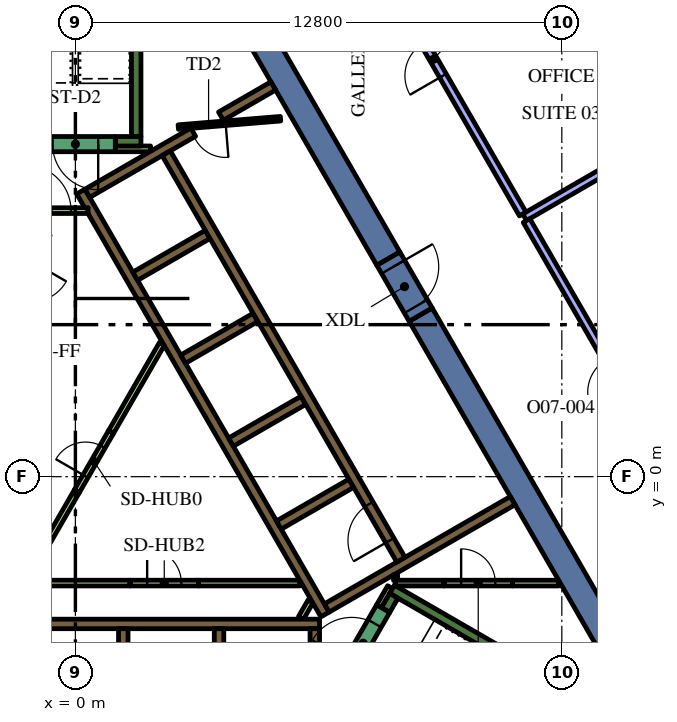
"""IFC4 building model, lengths in metres.
Left out: names, types, materials, properties, quantities, classifications, styles, units other than length and angle.
Written with IfcOpenShell. Run it as: python <this file> out.ifc"""

import sys

from ifc_helpers import new_model, si_unit, direction, frame, frame_2d, origin, place, context, subcontext, project, spatial, polyline, rectangle, outline, extrude, element, fill, save


model = new_model("IFC4")
c1 = context("Model", 3, precision=1e-05, world=origin(), true_north=direction((0.0, 1.0)))
c2 = subcontext(c1, "Body", "Model", "MODEL_VIEW")
j1 = project(units=[si_unit("LENGTHUNIT", "METRE"), si_unit("PLANEANGLEUNIT", "RADIAN")], contexts=[c1])
p1 = place(None, origin())
s1 = spatial("IfcSite", under=j1, at=p1, CompositionType="ELEMENT")
p2 = place(p1, origin())
s2 = spatial("IfcBuilding", under=s1, at=p2, CompositionType="ELEMENT")
p3 = place(p2, frame((0.0, 0.0, 214.2)))
s3 = spatial("IfcBuildingStorey", under=s2, at=p3, CompositionType="ELEMENT", Elevation=214.2)
for number, where, z_axis, x_axis in (
    (1, (9.085, 4.264, 0.0), (0.0, 0.0, 1.0), (0.5, -0.866, 0.0)),
    (2, (8.235, 5.736, 0.0), (0.0, 0.0, 1.0), (-0.5, 0.866, 0.0)),
):
    element("IfcWall", number, at=place(p3, frame(where, z_axis=z_axis, x_axis=x_axis)), inside=s3, PredefinedType="SOLIDWALL", context=c2, shape_type="SweptSolid", body=[
        extrude(rectangle(XDim=12.472, YDim=0.7, at=frame_2d((6.236, 0.0))), origin(), (0.0, 0.0, 1.0), 4.2),
    ])
p4 = place(p3, frame((8.334, -2.964, 0.0), z_axis=(0.0, 0.0, 1.0), x_axis=(0.866016039709, -0.500016218704, 0.0)))
e3 = element("IfcWall", 3, at=p4, inside=s3, PredefinedType="SOLIDWALL", context=c2, shape_type="SweptSolid", body=[
    extrude(rectangle(XDim=7.05, YDim=0.25, at=frame_2d((3.525, 0.0))), origin(), (0.0, 0.0, 1.0), 4.2),
])
p5 = place(p3, frame((8.163, -3.511, 0.0), z_axis=(0.0, 0.0, 1.0), x_axis=(0.500127794843, 0.865951608824, 0.0)))
e4 = element("IfcWall", 4, at=p5, inside=s3, PredefinedType="SOLIDWALL", context=c2, shape_type="SweptSolid", body=[
    extrude(rectangle(XDim=0.435, YDim=0.25, at=frame_2d((0.217, 0.0))), origin(), (0.0, 0.0, 1.0), 4.2),
])
p6 = place(p3, frame((1.6, 8.95, 0.0), z_axis=(0.0, 0.0, 1.0), x_axis=(0.0, 1.0, 0.0)))
e5 = element("IfcWall", 5, at=p6, inside=s3, PredefinedType="SOLIDWALL", context=c2, shape_type="SweptSolid", body=[
    extrude(rectangle(XDim=6.8, YDim=0.25, at=frame_2d((3.4, 0.0))), origin(), (0.0, 0.0, 1.0), 4.2),
])
p7 = place(p3, frame((1.05, 8.825, 0.0), z_axis=(0.0, 0.0, 1.0), x_axis=(1.0, 0.0, 0.0)))
e6 = element("IfcWall", 6, at=p7, inside=s3, PredefinedType="SOLIDWALL", context=c2, shape_type="SweptSolid", body=[
    extrude(rectangle(XDim=0.675, YDim=0.25, at=frame_2d((0.337, 0.0))), origin(), (0.0, 0.0, 1.0), 4.2),
])
p8 = place(p3, frame((-5.806, -3.875, 0.0), z_axis=(0.0, 0.0, 1.0), x_axis=(1.0, 0.0, 0.0)))
e7 = element("IfcWall", 7, at=p8, inside=s3, PredefinedType="SOLIDWALL", context=c2, shape_type="SweptSolid", body=[
    extrude(rectangle(XDim=12.231, YDim=0.25, at=frame_2d((6.116, 0.0))), origin(), (0.0, 0.0, 1.0), 4.2),
])
p9 = place(p3, frame((6.3, -7.24, 0.0), z_axis=(0.0, 0.0, 1.0), x_axis=(0.0, 1.0, 0.0)))
e8 = element("IfcWall", 8, at=p9, inside=s3, PredefinedType="SOLIDWALL", context=c2, shape_type="SweptSolid", body=[
    extrude(rectangle(XDim=3.24, YDim=0.25, at=frame_2d((1.62, 0.0))), origin(), (0.0, 0.0, 1.0), 4.2),
])
for number, where, z_axis, x_axis in (
    (9, (3.78, -4.0, 0.0), (0.0, 0.0, 1.0), (0.0, -1.0, 0.0)),
    (10, (1.26, -4.0, 0.0), (0.0, 0.0, 1.0), (0.0, -1.0, 0.0)),
):
    element("IfcWall", number, at=place(p3, frame(where, z_axis=z_axis, x_axis=x_axis)), inside=s3, PredefinedType="SOLIDWALL", context=c2, shape_type="SweptSolid", body=[
        extrude(rectangle(XDim=2.2, YDim=0.25, at=frame_2d((1.1, 0.0))), origin(), (0.0, 0.0, 1.0), 4.2),
    ])
p10 = place(p3, origin())
e11 = element("IfcWall", 11, at=p10, inside=s3, PredefinedType="SOLIDWALL", context=c2, shape_type="SweptSolid", body=[
    extrude(outline(polyline([(0.332, 6.925), (0.335, 6.925), (0.335, 6.925), (0.335, 6.925), (0.335, 7.075), (0.335, 7.075), (0.335, 7.075), (0.245, 7.075), (0.035, 7.439), (0.252, 7.564), (0.377, 7.348), (1.512, 5.382), (1.637, 5.165), (2.221, 4.153), (2.771, 3.199), (2.896, 2.983), (3.138, 2.564), (4.031, 1.017), (4.156, 0.801), (5.292, -1.165), (5.417, -1.382), (6.073, -2.519), (6.552, -3.348), (6.677, -3.564), (6.46, -3.689), (0.332, 6.925)])), origin(), (0.0, 0.0, 1.0), 4.2),
])
p11 = place(p3, frame((3.1, 9.064, 0.0), z_axis=(0.0, 0.0, 1.0), x_axis=(-0.866030133475, -0.499991807846, 0.0)))
e12 = element("IfcWall", 12, at=p11, inside=s3, PredefinedType="SOLIDWALL", context=c2, shape_type="SweptSolid", body=[
    extrude(rectangle(XDim=3.217, YDim=0.25, at=frame_2d((1.608, 0.0))), origin(), (0.0, 0.0, 1.0), 4.2),
])
p12 = place(p3, frame((1.574, 5.274, 0.0), z_axis=(0.0, 0.0, 1.0), x_axis=(0.866028486751, 0.499994660107, 0.0)))
e13 = element("IfcWall", 13, at=p12, inside=s3, PredefinedType="SOLIDWALL", context=c2, shape_type="SweptSolid", body=[
    extrude(rectangle(XDim=2.2, YDim=0.25, at=frame_2d((1.1, 0.0))), origin(), (0.0, 0.0, 1.0), 4.2),
])
for number, where, z_axis, x_axis in (
    (14, (2.834, 3.091, 0.0), (0.0, 0.0, 1.0), (0.866, 0.5, 0.0)),
    (15, (4.094, 0.909, 0.0), (0.0, 0.0, 1.0), (0.866, 0.5, 0.0)),
    (16, (5.354, -1.274, 0.0), (0.0, 0.0, 1.0), (0.866, 0.5, 0.0)),
):
    element("IfcWall", number, at=place(p3, frame(where, z_axis=z_axis, x_axis=x_axis)), inside=s3, PredefinedType="SOLIDWALL", context=c2, shape_type="SweptSolid", body=[
        extrude(rectangle(XDim=2.2, YDim=0.25, at=frame_2d((1.1, 0.0))), origin(), (0.0, 0.0, 1.0), 4.2),
    ])
p13 = place(p3, frame((11.507, -0.631, 0.0), z_axis=(0.0, 0.0, 1.0), x_axis=(-0.866011447264, -0.500024172624, 0.0)))
e17 = element("IfcWall", 17, at=p13, inside=s3, PredefinedType="SOLIDWALL", context=c2, shape_type="SweptSolid", body=[
    extrude(rectangle(XDim=5.65, YDim=0.25, at=frame_2d((2.825, 0.0))), origin(), (0.0, 0.0, 1.0), 4.2),
])
p14 = place(p3, frame((3.83, 9.486, 0.0), z_axis=(0.0, 0.0, 1.0), x_axis=(0.865986202621, 0.500067892261, 0.0)))
e18 = element("IfcWall", 18, at=p14, inside=s3, PredefinedType="SOLIDWALL", context=c2, shape_type="SweptSolid", body=[
    extrude(rectangle(XDim=1.591, YDim=0.25, at=frame_2d((0.795, 0.0))), origin(), (0.0, 0.0, 1.0), 4.2),
])
p15 = place(p3, frame((0.941, 1.179, 0.0), z_axis=(0.0, 0.0, 1.0), x_axis=(0.499962406319, 0.866047107418, 0.0)))
e19 = element("IfcWall", 19, at=p15, inside=s3, PredefinedType="PARTITIONING", context=c2, shape_type="SweptSolid", body=[
    extrude(rectangle(XDim=2.672, YDim=0.15, at=frame_2d((1.336, 0.0))), origin(), (0.0, 0.0, 1.0), 3.45),
])
p16 = place(p3, frame((1.438, -2.8, 0.0), z_axis=(0.0, 0.0, 1.0), x_axis=(-1.0, 0.0, 0.0)))
e20 = element("IfcWall", 20, at=p16, inside=s3, PredefinedType="PARTITIONING", context=c2, shape_type="SweptSolid", body=[
    extrude(rectangle(XDim=7.781, YDim=0.15, at=frame_2d((3.891, 0.0))), origin(), (0.0, 0.0, 1.0), 3.45),
])
for number, where, z_axis, x_axis in (
    (21, (-1.295, -2.693, 0.0), (0.0, 0.0, 1.0), (0.5, 0.866, 0.0)),
    (22, (3.238, -2.8, 0.0), (0.0, 0.0, 1.0), (1.0, 0.0, 0.0)),
):
    element("IfcWall", number, at=place(p3, frame(where, z_axis=z_axis, x_axis=x_axis)), inside=s3, PredefinedType="PARTITIONING", context=c2, shape_type="SweptSolid", body=[
        extrude(rectangle(XDim=2.672, YDim=0.15, at=frame_2d((1.336, 0.0))), origin(), (0.0, 0.0, 1.0), 3.45),
    ])
p17 = place(p3, frame((1.05, 8.625, 0.0), z_axis=(0.0, 0.0, 1.0), x_axis=(1.0, 0.0, 0.0)))
e23 = element("IfcWall", 23, at=p17, inside=s3, PredefinedType="PARTITIONING", context=c2, shape_type="SweptSolid", body=[
    extrude(rectangle(XDim=0.929, YDim=0.15, at=frame_2d((0.464, 0.0))), origin(), (0.0, 0.0, 1.0), 3.45),
])
p18 = place(p3, frame((8.412, -2.8, 0.0), z_axis=(0.0, 0.0, 1.0), x_axis=(1.0, 0.0, 0.0)))
e24 = element("IfcWall", 24, at=p18, inside=s3, PredefinedType="PARTITIONING", context=c2, shape_type="SweptSolid", body=[
    extrude(rectangle(XDim=1.288, YDim=0.15, at=frame_2d((0.644, 0.0))), origin(), (0.0, 0.0, 1.0), 4.2),
])
p19 = place(p3, frame((8.37, -2.65, 0.0), z_axis=(0.0, 0.0, 1.0), x_axis=(1.0, 0.0, 0.0)))
e25 = element("IfcWall", 25, at=p19, inside=s3, PredefinedType="PARTITIONING", context=c2, shape_type="SweptSolid", body=[
    extrude(rectangle(XDim=0.108, YDim=0.15, at=frame_2d((0.054, 0.0))), origin(), (0.0, 0.0, 1.0), 4.2),
])
p20 = place(p3, frame((8.281, -2.907, 0.0), z_axis=(0.0, 0.0, 1.0), x_axis=(-0.500193841991, -0.86591346013, 0.0)))
e26 = element("IfcWall", 26, at=p20, inside=s3, PredefinedType="PARTITIONING", context=c2, shape_type="SweptSolid", body=[
    extrude(rectangle(XDim=0.583, YDim=0.15, at=frame_2d((0.292, 0.0))), origin(), (0.0, 0.0, 1.0), 4.2),
])
p21 = place(p3, frame((11.5, -2.801, 0.0), z_axis=(0.0, 0.0, 1.0), x_axis=(1.0, 0.0, 0.0)))
e27 = element("IfcWall", 27, at=p21, inside=s3, PredefinedType="PARTITIONING", context=c2, shape_type="SweptSolid", body=[
    extrude(rectangle(XDim=1.222, YDim=0.15, at=frame_2d((0.611, 0.0))), origin(), (0.0, 0.0, 1.0), 3.45),
])
p22 = place(p3, frame((5.936, -3.718, 0.0), z_axis=(0.0, 0.0, 1.0), x_axis=(0.499890179513, 0.866088799389, 0.0)))
e28 = element("IfcWall", 28, at=p22, inside=s3, PredefinedType="PARTITIONING", context=c2, shape_type="SweptSolid", body=[
    extrude(rectangle(XDim=0.504, YDim=0.15, at=frame_2d((0.252, 0.0))), origin(), (0.0, 0.0, 1.0), 3.45),
])
p23 = place(p3, frame((8.565, -2.185, 0.0), z_axis=(0.0, 0.0, 1.0), x_axis=(-0.499997954832, 0.866026584559, 0.0)))
e29 = element("IfcWall", 29, at=p23, inside=s3, PredefinedType="SOLIDWALL", context=c2, shape_type="SweptSolid", body=[
    extrude(rectangle(XDim=12.35, YDim=0.25, at=frame_2d((6.175, 0.0))), origin(), (0.0, 0.0, 1.0), 4.2),
])
p24 = place(p23, frame((0.585, 0.0, 0.0)))
e30 = element("IfcOpeningElement", 30, at=p24, cuts=e29, PredefinedType="OPENING", context=c2, shape_type="SweptSolid", body=[
    extrude(rectangle(XDim=1.1, YDim=2.1, at=frame_2d((0.55, 1.05))), frame((0.0, 0.135, 0.0), z_axis=(0.0, -1.0, 0.0), x_axis=(1.0, 0.0, 0.0)), (0.0, 0.0, 1.0), 0.27),
])
p25 = place(p3, frame((7.048, -5.292, 0.0), z_axis=(0.0, 0.0, 1.0), x_axis=(0.49994051562, 0.866059744384, 0.0)))
e31 = element("IfcWall", 31, at=p25, inside=s3, PredefinedType="SOLIDWALL", context=c2, shape_type="SweptSolid", body=[
    extrude(rectangle(XDim=2.1, YDim=0.4, at=frame_2d((1.05, 0.0))), origin(), (0.0, 0.0, 1.0), 4.2),
])
p26 = place(p25, frame((0.45, 0.0, 0.0)))
e32 = element("IfcOpeningElement", 32, at=p26, cuts=e31, PredefinedType="OPENING", context=c2, shape_type="SweptSolid", body=[
    extrude(rectangle(XDim=1.2, YDim=2.1, at=frame_2d((0.6, 1.05))), frame((0.0, 0.21, 0.0), z_axis=(0.0, -1.0, 0.0), x_axis=(1.0, 0.0, 0.0)), (0.0, 0.0, 1.0), 0.42),
])
p27 = place(p3, frame((1.05, 8.75, 0.0), z_axis=(0.0, 0.0, 1.0), x_axis=(-1.0, 0.0, 0.0)))
e33 = element("IfcWall", 33, at=p27, inside=s3, PredefinedType="SOLIDWALL", context=c2, shape_type="SweptSolid", body=[
    extrude(rectangle(XDim=2.1, YDim=0.4, at=frame_2d((1.05, 0.0))), origin(), (0.0, 0.0, 1.0), 4.2),
])
p28 = place(p27, frame((0.45, 0.0, 0.0)))
e34 = element("IfcOpeningElement", 34, at=p28, cuts=e33, PredefinedType="OPENING", context=c2, shape_type="SweptSolid", body=[
    extrude(rectangle(XDim=1.2, YDim=2.1, at=frame_2d((0.6, 1.05))), frame((0.0, 0.21, 0.0), z_axis=(0.0, -1.0, 0.0), x_axis=(1.0, 0.0, 0.0)), (0.0, 0.0, 1.0), 0.42),
])
p29 = place(p3, frame((5.398, 9.419, 0.0), z_axis=(0.0, 0.0, 1.0), x_axis=(-0.996653416376, -0.081743303248, 0.0)))
e35 = element("IfcWall", 35, at=p29, inside=s3, PredefinedType="PARTITIONING", context=c2, shape_type="SweptSolid", body=[
    extrude(rectangle(XDim=2.7, YDim=0.12, at=frame_2d((1.35, 0.0))), origin(), (0.0, 0.0, 1.0), 3.45),
])
p30 = place(p29, frame((1.45, 0.0, 0.0)))
e36 = element("IfcOpeningElement", 36, at=p30, cuts=e35, PredefinedType="OPENING", context=c2, shape_type="SweptSolid", body=[
    extrude(rectangle(XDim=0.9, YDim=2.1, at=frame_2d((0.45, 1.05))), frame((0.0, 0.07, 0.0), z_axis=(0.0, -1.0, 0.0), x_axis=(1.0, 0.0, 0.0)), (0.0, 0.0, 1.0), 0.14),
])
p31 = place(p3, frame((-1.765, 7.0, 0.0), z_axis=(0.0, 0.0, 1.0), x_axis=(1.0, 0.0, 0.0)))
e37 = element("IfcWall", 37, at=p31, inside=s3, PredefinedType="PARTITIONING", context=c2, shape_type="SweptSolid", body=[
    extrude(rectangle(XDim=2.1, YDim=0.15, at=frame_2d((1.05, 0.0))), origin(), (0.0, 0.0, 1.0), 3.45),
])
p32 = place(p31, frame((0.45, 0.0, 0.0)))
e38 = element("IfcOpeningElement", 38, at=p32, cuts=e37, PredefinedType="OPENING", context=c2, shape_type="SweptSolid", body=[
    extrude(rectangle(XDim=1.2, YDim=2.1, at=frame_2d((0.6, 1.05))), frame((0.0, 0.085, 0.0), z_axis=(0.0, -1.0, 0.0), x_axis=(1.0, 0.0, 0.0)), (0.0, 0.0, 1.0), 0.17),
])
p33 = place(p3, frame((8.235, 5.736, 0.0), z_axis=(0.0, 0.0, 1.0), x_axis=(0.499954529098, -0.86605165483, 0.0)))
e39 = element("IfcWall", 39, at=p33, inside=s3, PredefinedType="SOLIDWALL", context=c2, shape_type="SweptSolid", body=[
    extrude(rectangle(XDim=1.7, YDim=0.7, at=frame_2d((0.85, 0.0))), origin(), (0.0, 0.0, 1.0), 4.2),
])
p34 = place(p33, frame((0.25, 0.0, 0.0)))
e40 = element("IfcOpeningElement", 40, at=p34, cuts=e39, PredefinedType="OPENING", context=c2, shape_type="SweptSolid", body=[
    extrude(rectangle(XDim=1.2, YDim=2.1, at=frame_2d((0.6, 1.05))), frame((0.0, 0.36, 0.0), z_axis=(0.0, -1.0, 0.0), x_axis=(1.0, 0.0, 0.0)), (0.0, 0.0, 1.0), 0.72),
])
p35 = place(p3, frame((0.041, -0.379, 0.0), z_axis=(0.0, 0.0, 1.0), x_axis=(0.499961193289, 0.866047807691, 0.0)))
e41 = element("IfcWall", 41, at=p35, inside=s3, PredefinedType="PARTITIONING", context=c2, shape_type="SweptSolid", body=[
    extrude(rectangle(XDim=1.8, YDim=0.15, at=frame_2d((0.9, 0.0))), origin(), (0.0, 0.0, 1.0), 3.45),
])
p36 = place(p35, frame((0.45, 0.0, 0.0)))
e42 = element("IfcOpeningElement", 42, at=p36, cuts=e41, PredefinedType="OPENING", context=c2, shape_type="SweptSolid", body=[
    extrude(rectangle(XDim=0.9, YDim=2.1, at=frame_2d((0.45, 1.05))), frame((0.0, 0.085, 0.0), z_axis=(0.0, -1.0, 0.0), x_axis=(1.0, 0.0, 0.0)), (0.0, 0.0, 1.0), 0.17),
])
p37 = place(p3, frame((1.438, -2.8, 0.0), z_axis=(0.0, 0.0, 1.0), x_axis=(1.0, 0.0, 0.0)))
e43 = element("IfcWall", 43, at=p37, inside=s3, PredefinedType="PARTITIONING", context=c2, shape_type="SweptSolid", body=[
    extrude(rectangle(XDim=1.8, YDim=0.15, at=frame_2d((0.9, 0.0))), origin(), (0.0, 0.0, 1.0), 3.45),
])
p38 = place(p37, frame((0.45, 0.0, 0.0)))
e44 = element("IfcOpeningElement", 44, at=p38, cuts=e43, PredefinedType="OPENING", context=c2, shape_type="SweptSolid", body=[
    extrude(rectangle(XDim=0.9, YDim=2.1, at=frame_2d((0.45, 1.05))), frame((0.0, 0.085, 0.0), z_axis=(0.0, -1.0, 0.0), x_axis=(1.0, 0.0, 0.0)), (0.0, 0.0, 1.0), 0.17),
])
p39 = place(p3, frame((9.7, -2.8, 0.0), z_axis=(0.0, 0.0, 1.0), x_axis=(1.0, 0.0, 0.0)))
e45 = element("IfcWall", 45, at=p39, inside=s3, PredefinedType="PARTITIONING", context=c2, shape_type="SweptSolid", body=[
    extrude(rectangle(XDim=1.8, YDim=0.15, at=frame_2d((0.9, 0.0))), origin(), (0.0, 0.0, 1.0), 3.45),
])
p40 = place(p39, frame((0.45, 0.0, 0.0)))
e46 = element("IfcOpeningElement", 46, at=p40, cuts=e45, PredefinedType="OPENING", context=c2, shape_type="SweptSolid", body=[
    extrude(rectangle(XDim=0.9, YDim=2.1, at=frame_2d((0.45, 1.05))), frame((0.0, 0.085, 0.0), z_axis=(0.0, -1.0, 0.0), x_axis=(1.0, 0.0, 0.0)), (0.0, 0.0, 1.0), 0.17),
])
p41 = place(p3, frame((11.821, 6.825, 0.0), z_axis=(0.0, 0.0, 1.0), x_axis=(0.866011792348, 0.500023574959, 0.0)))
e47 = element("IfcWall", 47, at=p41, inside=s3, PredefinedType="PARTITIONING", context=c2, shape_type="SweptSolid", body=[
    extrude(rectangle(XDim=5.381, YDim=0.2, at=frame_2d((2.69, 0.0))), origin(), (0.0, 0.0, 1.0), 3.45),
])
p42 = place(p3, frame((16.581, -1.419, 0.0), z_axis=(0.0, 0.0, 1.0), x_axis=(-0.500019350398, 0.866014231539, 0.0)))
e48 = element("IfcWall", 48, at=p42, inside=s3, PredefinedType="PARTITIONING", context=c2, shape_type="SweptSolid", body=[
    extrude(rectangle(XDim=9.42, YDim=0.2, at=frame_2d((4.71, 0.0))), origin(), (0.0, 0.0, 1.0), 3.45),
])
p43 = place(p42, frame((4.2, 0.0, 0.0)))
e49 = element("IfcOpeningElement", 49, at=p43, cuts=e48, PredefinedType="OPENING", context=c2, shape_type="SweptSolid", body=[
    extrude(rectangle(XDim=1.0, YDim=2.1, at=frame_2d((0.5, 1.05))), frame((0.0, 0.11, 0.0), z_axis=(0.0, -1.0, 0.0), x_axis=(1.0, 0.0, 0.0)), (0.0, 0.0, 1.0), 0.22),
])
p44 = place(p3, frame((11.771, 6.912, 0.0), z_axis=(0.0, 0.0, 1.0), x_axis=(-0.500008127286, 0.866020711443, 0.0)))
e50 = element("IfcWall", 50, at=p44, inside=s3, PredefinedType="PARTITIONING", context=c2, shape_type="SweptSolid", body=[
    extrude(rectangle(XDim=9.42, YDim=0.2, at=frame_2d((4.71, 0.0))), origin(), (0.0, 0.0, 1.0), 3.45),
])
p45 = place(p44, frame((4.2, 0.0, 0.0)))
e51 = element("IfcOpeningElement", 51, at=p45, cuts=e50, PredefinedType="OPENING", context=c2, shape_type="SweptSolid", body=[
    extrude(rectangle(XDim=1.0, YDim=2.1, at=frame_2d((0.5, 1.05))), frame((0.0, 0.11, 0.0), z_axis=(0.0, -1.0, 0.0), x_axis=(1.0, 0.0, 0.0)), (0.0, 0.0, 1.0), 0.22),
])
p46 = place(p24, origin())
e52 = element("IfcDoor", 52, at=p46, inside=s3, OperationType="DOUBLE_DOOR_SLIDING", PredefinedType="DOOR", context=c2, shape_type="SweptSolid", body=[
    extrude(rectangle(XDim=1.1, YDim=2.1, at=frame_2d((0.55, 1.05))), frame((0.0, 0.025, 0.0), z_axis=(0.0, -1.0, 0.0), x_axis=(1.0, 0.0, 0.0)), (0.0, 0.0, 1.0), 0.05),
])
fill(e30, e52)
p47 = place(p26, origin())
e53 = element("IfcDoor", 53, at=p47, inside=s3, OperationType="SINGLE_SWING_LEFT", PredefinedType="DOOR", context=c2, shape_type="SweptSolid", body=[
    extrude(rectangle(XDim=1.2, YDim=2.1, at=frame_2d((0.6, 1.05))), frame((0.0, 0.025, 0.0), z_axis=(0.0, -1.0, 0.0), x_axis=(1.0, 0.0, 0.0)), (0.0, 0.0, 1.0), 0.05),
])
fill(e32, e53)
p48 = place(p28, origin())
e54 = element("IfcDoor", 54, at=p48, inside=s3, OperationType="SINGLE_SWING_LEFT", PredefinedType="DOOR", context=c2, shape_type="SweptSolid", body=[
    extrude(rectangle(XDim=1.2, YDim=2.1, at=frame_2d((0.6, 1.05))), frame((0.0, 0.025, 0.0), z_axis=(0.0, -1.0, 0.0), x_axis=(1.0, 0.0, 0.0)), (0.0, 0.0, 1.0), 0.05),
])
fill(e34, e54)
p49 = place(p30, origin())
e55 = element("IfcDoor", 55, at=p49, inside=s3, OperationType="SINGLE_SWING_LEFT", PredefinedType="DOOR", context=c2, shape_type="SweptSolid", body=[
    extrude(rectangle(XDim=0.9, YDim=2.1, at=frame_2d((0.45, 1.05))), frame((0.0, 0.025, 0.0), z_axis=(0.0, -1.0, 0.0), x_axis=(1.0, 0.0, 0.0)), (0.0, 0.0, 1.0), 0.05),
])
fill(e36, e55)
p50 = place(p32, origin())
e56 = element("IfcDoor", 56, at=p50, inside=s3, OperationType="SINGLE_SWING_LEFT", PredefinedType="DOOR", context=c2, shape_type="SweptSolid", body=[
    extrude(rectangle(XDim=1.2, YDim=2.1, at=frame_2d((0.6, 1.05))), frame((0.0, 0.025, 0.0), z_axis=(0.0, -1.0, 0.0), x_axis=(1.0, 0.0, 0.0)), (0.0, 0.0, 1.0), 0.05),
])
fill(e38, e56)
p51 = place(p34, origin())
e57 = element("IfcDoor", 57, at=p51, inside=s3, OperationType="SINGLE_SWING_LEFT", PredefinedType="DOOR", context=c2, shape_type="SweptSolid", body=[
    extrude(rectangle(XDim=1.2, YDim=2.1, at=frame_2d((0.6, 1.05))), frame((0.0, 0.025, 0.0), z_axis=(0.0, -1.0, 0.0), x_axis=(1.0, 0.0, 0.0)), (0.0, 0.0, 1.0), 0.05),
])
fill(e40, e57)
p52 = place(p36, origin())
e58 = element("IfcDoor", 58, at=p52, inside=s3, OperationType="SINGLE_SWING_LEFT", PredefinedType="DOOR", context=c2, shape_type="SweptSolid", body=[
    extrude(rectangle(XDim=0.9, YDim=2.1, at=frame_2d((0.45, 1.05))), frame((0.0, 0.025, 0.0), z_axis=(0.0, -1.0, 0.0), x_axis=(1.0, 0.0, 0.0)), (0.0, 0.0, 1.0), 0.05),
])
fill(e42, e58)
p53 = place(p38, origin())
e59 = element("IfcDoor", 59, at=p53, inside=s3, OperationType="SINGLE_SWING_LEFT", PredefinedType="DOOR", context=c2, shape_type="SweptSolid", body=[
    extrude(rectangle(XDim=0.9, YDim=2.1, at=frame_2d((0.45, 1.05))), frame((0.0, 0.025, 0.0), z_axis=(0.0, -1.0, 0.0), x_axis=(1.0, 0.0, 0.0)), (0.0, 0.0, 1.0), 0.05),
])
fill(e44, e59)
p54 = place(p40, origin())
e60 = element("IfcDoor", 60, at=p54, inside=s3, OperationType="SINGLE_SWING_LEFT", PredefinedType="DOOR", context=c2, shape_type="SweptSolid", body=[
    extrude(rectangle(XDim=0.9, YDim=2.1, at=frame_2d((0.45, 1.05))), frame((0.0, 0.025, 0.0), z_axis=(0.0, -1.0, 0.0), x_axis=(1.0, 0.0, 0.0)), (0.0, 0.0, 1.0), 0.05),
])
fill(e46, e60)
p55 = place(p45, origin())
e61 = element("IfcDoor", 61, at=p55, inside=s3, OperationType="SINGLE_SWING_LEFT", PredefinedType="DOOR", context=c2, shape_type="SweptSolid", body=[
    extrude(rectangle(XDim=1.0, YDim=2.1, at=frame_2d((0.5, 1.05))), frame((0.0, 0.025, 0.0), z_axis=(0.0, -1.0, 0.0), x_axis=(1.0, 0.0, 0.0)), (0.0, 0.0, 1.0), 0.05),
])
fill(e51, e61)
save(model, sys.argv[1])
